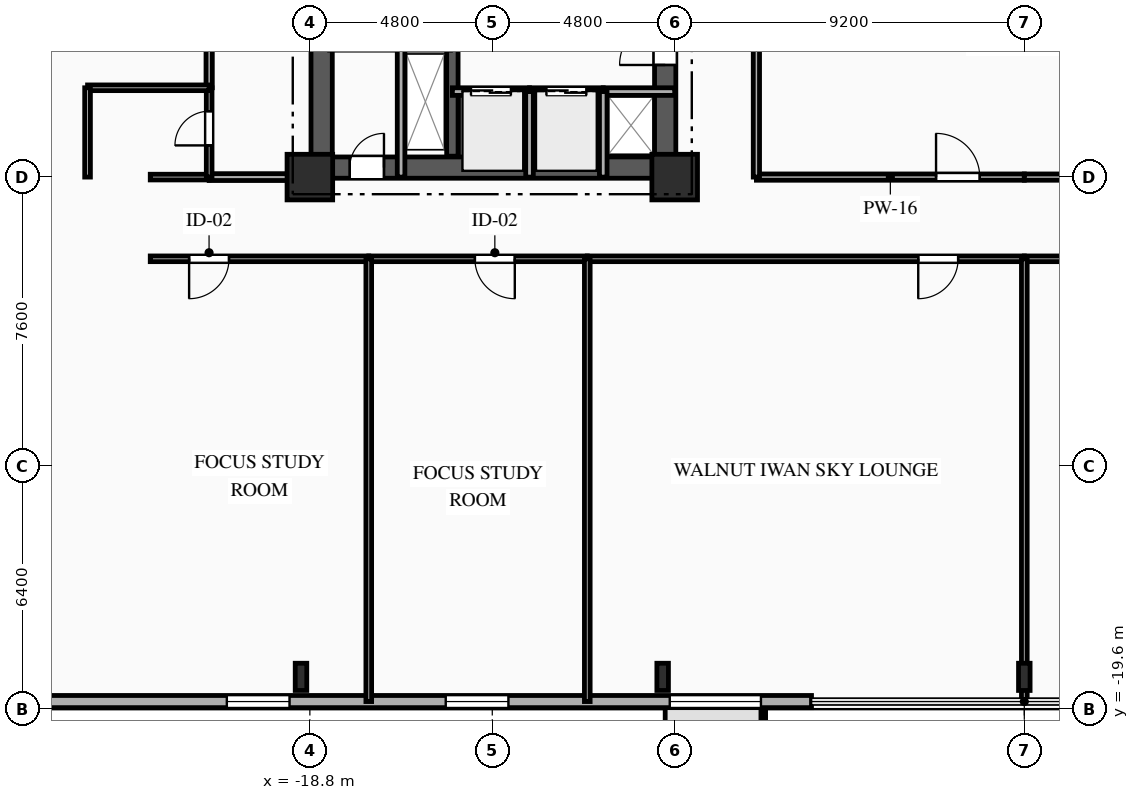
"""IFC4 building model, lengths in metres.
Left out: names, types, materials, properties, quantities, classifications, styles, units other than length and angle.
Written with IfcOpenShell. Run it as: python <this file> out.ifc"""

import sys

from ifc_helpers import new_model, si_unit, direction, frame, frame_2d, origin, origin_2d, place, context, subcontext, project, spatial, rectangle, i_section, extrude, element, fill, save


model = new_model("IFC4")
c1 = context("Model", 3, precision=1e-05, world=origin(), true_north=direction((0.0, 1.0)))
c2 = subcontext(c1, "Body", "Model", "MODEL_VIEW")
j1 = project(units=[si_unit("LENGTHUNIT", "METRE"), si_unit("PLANEANGLEUNIT", "RADIAN")], contexts=[c1])
p1 = place(None, origin())
s1 = spatial("IfcSite", under=j1, at=p1, CompositionType="ELEMENT")
p2 = place(p1, origin())
s2 = spatial("IfcBuilding", under=s1, at=p2, CompositionType="ELEMENT")
p3 = place(p2, frame((0.0, 0.0, 47.1)))
s3 = spatial("IfcBuildingStorey", under=s2, at=p3, CompositionType="ELEMENT", Elevation=47.1)
for number, where, z_axis, x_axis in (
    (1, (-18.8, -5.6, 0.0), (0.0, 0.0, 1.0), (1.0, 0.0, 0.0)),
    (2, (-9.2, -5.6, 0.0), (0.0, 0.0, 1.0), (1.0, 0.0, 0.0)),
):
    element("IfcColumn", number, at=place(p3, frame(where, z_axis=z_axis, x_axis=x_axis)), inside=s3, PredefinedType="COLUMN", context=c2, shape_type="SweptSolid", body=[
        extrude(rectangle(XDim=1.2, YDim=1.2, at=origin_2d()), origin(), (0.0, 0.0, 1.0), 3.35),
    ])
for number, where, z_axis, x_axis in (
    (3, (-19.033, -18.75, 0.0), (0.0, 0.0, 1.0), (1.0, 0.0, 0.0)),
    (4, (-9.517, -18.75, 0.0), (0.0, 0.0, 1.0), (1.0, 0.0, 0.0)),
    (5, (0.0, -18.75, 0.0), (0.0, 0.0, 1.0), (1.0, 0.0, 0.0)),
):
    element("IfcColumn", number, at=place(p3, frame(where, z_axis=z_axis, x_axis=x_axis)), inside=s3, PredefinedType="COLUMN", context=c2, shape_type="SweptSolid", body=[
        extrude(i_section(OverallWidth=0.304, OverallDepth=0.716, WebThickness=0.021, FlangeThickness=0.04, FilletRadius=0.027, at=origin_2d()), origin(), (0.0, 0.0, 1.0), 3.35),
    ])
p4 = place(p3, frame((-5.6, -19.4, 0.0), z_axis=(0.0, 0.0, 1.0), x_axis=(-1.0, 0.0, 0.0)))
e6 = element("IfcWall", 6, at=p4, inside=s3, PredefinedType="SOLIDWALL", context=c2, shape_type="SweptSolid", body=[
    extrude(rectangle(XDim=23.6, YDim=0.32, at=frame_2d((11.8, 0.0))), origin(), (0.0, 0.0, 1.0), 3.035),
])
p5 = place(p4, frame((1.33, 0.0, 0.85)))
e7 = element("IfcOpeningElement", 7, at=p5, cuts=e6, PredefinedType="OPENING", context=c2, shape_type="SweptSolid", body=[
    extrude(rectangle(XDim=2.4, YDim=1.95, at=frame_2d((1.2, 0.975))), frame((0.0, 0.17, 0.0), z_axis=(0.0, -1.0, 0.0), x_axis=(1.0, 0.0, 0.0)), (0.0, 0.0, 1.0), 0.34),
])
p6 = place(p4, frame((7.975, 0.0, 0.85)))
e8 = element("IfcOpeningElement", 8, at=p6, cuts=e6, PredefinedType="OPENING", context=c2, shape_type="SweptSolid", body=[
    extrude(rectangle(XDim=1.65, YDim=1.85, at=frame_2d((0.825, 0.925))), frame((0.0, 0.17, 0.0), z_axis=(0.0, -1.0, 0.0), x_axis=(1.0, 0.0, 0.0)), (0.0, 0.0, 1.0), 0.34),
])
p7 = place(p4, frame((13.735, 0.0, 0.85)))
e9 = element("IfcOpeningElement", 9, at=p7, cuts=e6, PredefinedType="OPENING", context=c2, shape_type="SweptSolid", body=[
    extrude(rectangle(XDim=1.65, YDim=1.85, at=frame_2d((0.825, 0.925))), frame((0.0, 0.17, 0.0), z_axis=(0.0, -1.0, 0.0), x_axis=(1.0, 0.0, 0.0)), (0.0, 0.0, 1.0), 0.34),
])
p8 = place(p3, frame((-18.8, -5.35, 0.0), z_axis=(0.0, 0.0, 1.0), x_axis=(1.0, 0.0, 0.0)))
e10 = element("IfcWall", 10, at=p8, inside=s3, PredefinedType="SHEAR", context=c2, shape_type="SweptSolid", body=[
    extrude(rectangle(XDim=9.6, YDim=0.56, at=frame_2d((4.8, 0.0))), origin(), (0.0, 0.0, 1.0), 3.035),
])
p9 = place(p8, frame((1.05, 0.0, 0.0)))
e11 = element("IfcOpeningElement", 11, at=p9, cuts=e10, PredefinedType="OPENING", context=c2, shape_type="SweptSolid", body=[
    extrude(rectangle(XDim=0.9, YDim=2.1, at=frame_2d((0.45, 1.05))), frame((0.0, 0.29, 0.0), z_axis=(0.0, -1.0, 0.0), x_axis=(1.0, 0.0, 0.0)), (0.0, 0.0, 1.0), 0.58),
])
p10 = place(p3, frame((-18.49, -5.05, 0.0), z_axis=(0.0, 0.0, 1.0), x_axis=(0.0, 1.0, 0.0)))
e12 = element("IfcWall", 12, at=p10, inside=s3, PredefinedType="SHEAR", context=c2, shape_type="SweptSolid", body=[
    extrude(rectangle(XDim=10.1, YDim=0.56, at=frame_2d((5.05, 0.0))), origin(), (0.0, 0.0, 1.0), 3.035),
])
p11 = place(p3, frame((-9.45, -5.05, 0.0), z_axis=(0.0, 0.0, 1.0), x_axis=(0.0, 1.0, 0.0)))
e13 = element("IfcWall", 13, at=p11, inside=s3, PredefinedType="SHEAR", context=c2, shape_type="SweptSolid", body=[
    extrude(rectangle(XDim=10.1, YDim=0.56, at=frame_2d((5.05, 0.0))), origin(), (0.0, 0.0, 1.0), 3.035),
])
p12 = place(p11, frame((7.15, 0.0, 0.0)))
e14 = element("IfcOpeningElement", 14, at=p12, cuts=e13, PredefinedType="OPENING", context=c2, shape_type="SweptSolid", body=[
    extrude(rectangle(XDim=0.9, YDim=2.1, at=frame_2d((0.45, 1.05))), frame((0.0, 0.29, 0.0), z_axis=(0.0, -1.0, 0.0), x_axis=(1.0, 0.0, 0.0)), (0.0, 0.0, 1.0), 0.58),
])
p13 = place(p11, frame((2.4, 0.0, 0.0)))
e15 = element("IfcOpeningElement", 15, at=p13, cuts=e13, PredefinedType="OPENING", context=c2, shape_type="SweptSolid", body=[
    extrude(rectangle(XDim=1.2, YDim=2.15, at=frame_2d((0.6, 1.075))), frame((0.0, 0.29, 0.0), z_axis=(0.0, -1.0, 0.0), x_axis=(1.0, 0.0, 0.0)), (0.0, 0.0, 1.0), 0.58),
])
p14 = place(p3, frame((-15.05, -5.05, 0.0), z_axis=(0.0, 0.0, 1.0), x_axis=(0.0, 1.0, 0.0)))
e16 = element("IfcWall", 16, at=p14, inside=s3, PredefinedType="SHEAR", context=c2, shape_type="SweptSolid", body=[
    extrude(rectangle(XDim=10.1, YDim=0.3, at=frame_2d((5.05, 0.0))), origin(), (0.0, 0.0, 1.0), 3.035),
])
p15 = place(p3, frame((-16.4, -5.6, 0.0), z_axis=(0.0, 0.0, 1.0), x_axis=(0.0, 1.0, 0.0)))
e17 = element("IfcWall", 17, at=p15, inside=s3, PredefinedType="PARTITIONING", context=c2, shape_type="SweptSolid", body=[
    extrude(rectangle(XDim=3.49, YDim=0.2, at=frame_2d((1.745, 0.0))), origin(), (0.0, 0.0, 1.0), 3.035),
])
p16 = place(p3, frame((-15.05, -3.35, 0.0), z_axis=(0.0, 0.0, 1.0), x_axis=(1.0, 0.0, 0.0)))
e18 = element("IfcWall", 18, at=p16, inside=s3, PredefinedType="PARTITIONING", context=c2, shape_type="SweptSolid", body=[
    extrude(rectangle(XDim=2.03, YDim=0.2, at=frame_2d((1.015, 0.0))), origin(), (0.0, 0.0, 1.0), 3.035),
])
p17 = place(p16, frame((0.49, 0.0, 0.0)))
e19 = element("IfcOpeningElement", 19, at=p17, cuts=e18, PredefinedType="OPENING", context=c2, shape_type="SweptSolid", body=[
    extrude(rectangle(XDim=1.05, YDim=2.1, at=frame_2d((0.525, 1.05))), frame((0.0, 0.11, 0.0), z_axis=(0.0, -1.0, 0.0), x_axis=(1.0, 0.0, 0.0)), (0.0, 0.0, 1.0), 0.22),
])
p18 = place(p3, frame((-13.02, -3.35, 0.0), z_axis=(0.0, 0.0, 1.0), x_axis=(1.0, 0.0, 0.0)))
e20 = element("IfcWall", 20, at=p18, inside=s3, PredefinedType="PARTITIONING", context=c2, shape_type="SweptSolid", body=[
    extrude(rectangle(XDim=1.94, YDim=0.2, at=frame_2d((0.97, 0.0))), origin(), (0.0, 0.0, 1.0), 3.035),
])
p19 = place(p18, frame((0.445, 0.0, 0.0)))
e21 = element("IfcOpeningElement", 21, at=p19, cuts=e20, PredefinedType="OPENING", context=c2, shape_type="SweptSolid", body=[
    extrude(rectangle(XDim=1.05, YDim=2.1, at=frame_2d((0.525, 1.05))), frame((0.0, 0.11, 0.0), z_axis=(0.0, -1.0, 0.0), x_axis=(1.0, 0.0, 0.0)), (0.0, 0.0, 1.0), 0.22),
])
p20 = place(p3, frame((-11.08, -3.35, 0.0), z_axis=(0.0, 0.0, 1.0), x_axis=(1.0, 0.0, 0.0)))
e22 = element("IfcWall", 22, at=p20, inside=s3, PredefinedType="PARTITIONING", context=c2, shape_type="SweptSolid", body=[
    extrude(rectangle(XDim=1.88, YDim=0.2, at=frame_2d((0.94, 0.0))), origin(), (0.0, 0.0, 1.0), 2.75),
])
for number, where, z_axis, x_axis in (
    (23, (-13.02, -5.6, 0.0), (0.0, 0.0, 1.0), (0.0, 1.0, 0.0)),
    (24, (-11.08, -5.6, 0.0), (0.0, 0.0, 1.0), (0.0, 1.0, 0.0)),
):
    element("IfcWall", number, at=place(p3, frame(where, z_axis=z_axis, x_axis=x_axis)), inside=s3, PredefinedType="PARTITIONING", context=c2, shape_type="SweptSolid", body=[
        extrude(rectangle(XDim=2.25, YDim=0.2, at=frame_2d((1.125, 0.0))), origin(), (0.0, 0.0, 1.0), 3.035),
    ])
p21 = place(p3, frame((-21.45, -5.6, 0.0), z_axis=(0.0, 0.0, 1.0), x_axis=(1.0, 0.0, 0.0)))
e25 = element("IfcWall", 25, at=p21, inside=s3, PredefinedType="PARTITIONING", context=c2, shape_type="SweptSolid", body=[
    extrude(rectangle(XDim=2.65, YDim=0.18, at=frame_2d((1.325, 0.0))), origin(), (0.0, 0.0, 1.0), 3.035),
])
p22 = place(p3, frame((-23.0, -5.6, 0.0), z_axis=(0.0, 0.0, 1.0), x_axis=(1.0, 0.0, 0.0)))
e26 = element("IfcWall", 26, at=p22, inside=s3, PredefinedType="PLUMBINGWALL", context=c2, shape_type="SweptSolid", body=[
    extrude(rectangle(XDim=1.55, YDim=0.15, at=frame_2d((0.775, 0.0))), origin(), (0.0, 0.0, 1.0), 3.035),
])
p23 = place(p3, frame((-17.25, -7.75, 0.0), z_axis=(0.0, 0.0, 1.0), x_axis=(-1.0, 0.0, 0.0)))
e27 = element("IfcWall", 27, at=p23, inside=s3, PredefinedType="PARTITIONING", context=c2, shape_type="SweptSolid", body=[
    extrude(rectangle(XDim=5.75, YDim=0.15, at=frame_2d((2.875, 0.0))), origin(), (0.0, 0.0, 1.0), 3.035),
])
p24 = place(p23, frame((3.677, 0.0, 0.0)))
e28 = element("IfcOpeningElement", 28, at=p24, cuts=e27, PredefinedType="OPENING", context=c2, shape_type="SweptSolid", body=[
    extrude(rectangle(XDim=1.05, YDim=2.15, at=frame_2d((0.525, 1.075))), frame((0.0, 0.085, 0.0), z_axis=(0.0, -1.0, 0.0), x_axis=(1.0, 0.0, 0.0)), (0.0, 0.0, 1.0), 0.17),
])
p25 = place(p3, frame((-11.5, -7.75, 0.0), z_axis=(0.0, 0.0, 1.0), x_axis=(-1.0, 0.0, 0.0)))
e29 = element("IfcWall", 29, at=p25, inside=s3, PredefinedType="PARTITIONING", context=c2, shape_type="SweptSolid", body=[
    extrude(rectangle(XDim=5.75, YDim=0.15, at=frame_2d((2.875, 0.0))), origin(), (0.0, 0.0, 1.0), 3.035),
])
p26 = place(p25, frame((1.907, 0.0, 0.0)))
e30 = element("IfcOpeningElement", 30, at=p26, cuts=e29, PredefinedType="OPENING", context=c2, shape_type="SweptSolid", body=[
    extrude(rectangle(XDim=1.05, YDim=2.15, at=frame_2d((0.525, 1.075))), frame((0.0, 0.085, 0.0), z_axis=(0.0, -1.0, 0.0), x_axis=(1.0, 0.0, 0.0)), (0.0, 0.0, 1.0), 0.17),
])
p27 = place(p3, frame((0.0, -7.75, 0.0), z_axis=(0.0, 0.0, 1.0), x_axis=(-1.0, 0.0, 0.0)))
e31 = element("IfcWall", 31, at=p27, inside=s3, PredefinedType="PARTITIONING", context=c2, shape_type="SweptSolid", body=[
    extrude(rectangle(XDim=11.5, YDim=0.15, at=frame_2d((5.75, 0.0))), origin(), (0.0, 0.0, 1.0), 3.035),
])
p28 = place(p27, frame((1.741, 0.0, 0.0)))
e32 = element("IfcOpeningElement", 32, at=p28, cuts=e31, PredefinedType="OPENING", context=c2, shape_type="SweptSolid", body=[
    extrude(rectangle(XDim=1.05, YDim=2.15, at=frame_2d((0.525, 1.075))), frame((0.0, 0.085, 0.0), z_axis=(0.0, -1.0, 0.0), x_axis=(1.0, 0.0, 0.0)), (0.0, 0.0, 1.0), 0.17),
])
p29 = place(p3, frame((-7.05, -5.6, 0.0), z_axis=(0.0, 0.0, 1.0), x_axis=(1.0, 0.0, 0.0)))
e33 = element("IfcWall", 33, at=p29, inside=s3, PredefinedType="PARTITIONING", context=c2, shape_type="SweptSolid", body=[
    extrude(rectangle(XDim=7.05, YDim=0.165, at=frame_2d((3.525, 0.0))), origin(), (0.0, 0.0, 1.0), 2.52),
])
p30 = place(p29, frame((4.728, 0.0, 0.0)))
e34 = element("IfcOpeningElement", 34, at=p30, cuts=e33, PredefinedType="OPENING", context=c2, shape_type="SweptSolid", body=[
    extrude(rectangle(XDim=1.15, YDim=2.15, at=frame_2d((0.575, 1.075))), frame((0.0, 0.093, 0.0), z_axis=(0.0, -1.0, 0.0), x_axis=(1.0, 0.0, 0.0)), (0.0, 0.0, 1.0), 0.185),
])
p31 = place(p3, frame((11.5, -7.75, 0.0), z_axis=(0.0, 0.0, 1.0), x_axis=(-1.0, 0.0, 0.0)))
e35 = element("IfcWall", 35, at=p31, inside=s3, PredefinedType="PARTITIONING", context=c2, shape_type="SweptSolid", body=[
    extrude(rectangle(XDim=11.5, YDim=0.15, at=frame_2d((5.75, 0.0))), origin(), (0.0, 0.0, 1.0), 3.035),
])
p32 = place(p31, frame((8.709, 0.0, 0.0)))
e36 = element("IfcOpeningElement", 36, at=p32, cuts=e35, PredefinedType="OPENING", context=c2, shape_type="SweptSolid", body=[
    extrude(rectangle(XDim=1.05, YDim=2.15, at=frame_2d((0.525, 1.075))), frame((0.0, 0.085, 0.0), z_axis=(0.0, -1.0, 0.0), x_axis=(1.0, 0.0, 0.0)), (0.0, 0.0, 1.0), 0.17),
])
p33 = place(p3, frame((0.0, -5.6, 0.0), z_axis=(0.0, 0.0, 1.0), x_axis=(1.0, 0.0, 0.0)))
e37 = element("IfcWall", 37, at=p33, inside=s3, PredefinedType="PARTITIONING", context=c2, shape_type="SweptSolid", body=[
    extrude(rectangle(XDim=7.05, YDim=0.165, at=frame_2d((3.525, 0.0))), origin(), (0.0, 0.0, 1.0), 2.52),
])
p34 = place(p3, frame((-7.05, 1.45, 0.0), z_axis=(0.0, 0.0, 1.0), x_axis=(0.0, -1.0, 0.0)))
e38 = element("IfcWall", 38, at=p34, inside=s3, PredefinedType="PARTITIONING", context=c2, shape_type="SweptSolid", body=[
    extrude(rectangle(XDim=7.05, YDim=0.165, at=frame_2d((3.525, 0.0))), origin(), (0.0, 0.0, 1.0), 3.035),
])
p35 = place(p3, frame((-21.45, -5.6, 0.0), z_axis=(0.0, 0.0, 1.0), x_axis=(0.0, 1.0, 0.0)))
e39 = element("IfcWall", 39, at=p35, inside=s3, PredefinedType="PLUMBINGWALL", context=c2, shape_type="SweptSolid", body=[
    extrude(rectangle(XDim=2.35, YDim=0.15, at=frame_2d((1.175, 0.0))), origin(), (0.0, 0.0, 1.0), 3.035),
])
p36 = place(p35, frame((0.834, 0.0, 0.0)))
e40 = element("IfcOpeningElement", 40, at=p36, cuts=e39, PredefinedType="OPENING", context=c2, shape_type="SweptSolid", body=[
    extrude(rectangle(XDim=0.9, YDim=2.1, at=frame_2d((0.45, 1.05))), frame((0.0, 0.085, 0.0), z_axis=(0.0, -1.0, 0.0), x_axis=(1.0, 0.0, 0.0)), (0.0, 0.0, 1.0), 0.17),
])
p37 = place(p3, frame((-21.45, -3.25, 0.0), z_axis=(0.0, 0.0, 1.0), x_axis=(0.0, 1.0, 0.0)))
e41 = element("IfcWall", 41, at=p37, inside=s3, PredefinedType="PARTITIONING", context=c2, shape_type="SweptSolid", body=[
    extrude(rectangle(XDim=3.29, YDim=0.165, at=frame_2d((1.645, 0.0))), origin(), (0.0, 0.0, 1.0), 3.035),
])
p38 = place(p37, frame((1.438, 0.0, 0.0)))
e42 = element("IfcOpeningElement", 42, at=p38, cuts=e41, PredefinedType="OPENING", context=c2, shape_type="SweptSolid", body=[
    extrude(rectangle(XDim=1.15, YDim=2.15, at=frame_2d((0.575, 1.075))), frame((0.0, 0.093, 0.0), z_axis=(0.0, -1.0, 0.0), x_axis=(1.0, 0.0, 0.0)), (0.0, 0.0, 1.0), 0.185),
])
p39 = place(p3, frame((-24.65, -3.25, 0.0), z_axis=(0.0, 0.0, 1.0), x_axis=(1.0, 0.0, 0.0)))
e43 = element("IfcWall", 43, at=p39, inside=s3, PredefinedType="PLUMBINGWALL", context=c2, shape_type="SweptSolid", body=[
    extrude(rectangle(XDim=3.2, YDim=0.15, at=frame_2d((1.6, 0.0))), origin(), (0.0, 0.0, 1.0), 2.52),
])
p40 = place(p3, frame((-24.65, -5.6, 0.0), z_axis=(0.0, 0.0, 1.0), x_axis=(0.0, 1.0, 0.0)))
e44 = element("IfcWall", 44, at=p40, inside=s3, PredefinedType="PLUMBINGWALL", context=c2, shape_type="SweptSolid", body=[
    extrude(rectangle(XDim=2.35, YDim=0.15, at=frame_2d((1.175, 0.0))), origin(), (0.0, 0.0, 1.0), 3.035),
])
for number, where, z_axis, x_axis in (
    (45, (-17.25, -7.75, 0.0), (0.0, 0.0, 1.0), (0.0, -1.0, 0.0)),
    (46, (-11.5, -7.75, 0.0), (0.0, 0.0, 1.0), (0.0, -1.0, 0.0)),
    (47, (0.0, -7.75, 0.0), (0.0, 0.0, 1.0), (0.0, -1.0, 0.0)),
):
    element("IfcWall", number, at=place(p3, frame(where, z_axis=z_axis, x_axis=x_axis)), inside=s3, PredefinedType="PARTITIONING", context=c2, shape_type="SweptSolid", body=[
        extrude(rectangle(XDim=11.65, YDim=0.15, at=frame_2d((5.825, 0.0))), origin(), (0.0, 0.0, 1.0), 3.035),
    ])
p41 = place(p5, origin())
e48 = element("IfcWindow", 48, at=p41, inside=s3, PartitioningType="SINGLE_PANEL", PredefinedType="WINDOW", context=c2, shape_type="SweptSolid", body=[
    extrude(rectangle(XDim=2.4, YDim=1.95, at=frame_2d((1.2, 0.975))), frame((0.0, 0.03, 0.0), z_axis=(0.0, -1.0, 0.0), x_axis=(1.0, 0.0, 0.0)), (0.0, 0.0, 1.0), 0.06),
])
fill(e7, e48)
p42 = place(p6, origin())
e49 = element("IfcWindow", 49, at=p42, inside=s3, PartitioningType="SINGLE_PANEL", PredefinedType="WINDOW", context=c2, shape_type="SweptSolid", body=[
    extrude(rectangle(XDim=1.65, YDim=1.85, at=frame_2d((0.825, 0.925))), frame((0.0, 0.03, 0.0), z_axis=(0.0, -1.0, 0.0), x_axis=(1.0, 0.0, 0.0)), (0.0, 0.0, 1.0), 0.06),
])
fill(e8, e49)
p43 = place(p7, origin())
e50 = element("IfcWindow", 50, at=p43, inside=s3, PartitioningType="SINGLE_PANEL", PredefinedType="WINDOW", context=c2, shape_type="SweptSolid", body=[
    extrude(rectangle(XDim=1.65, YDim=1.85, at=frame_2d((0.825, 0.925))), frame((0.0, 0.03, 0.0), z_axis=(0.0, -1.0, 0.0), x_axis=(1.0, 0.0, 0.0)), (0.0, 0.0, 1.0), 0.06),
])
fill(e9, e50)
p44 = place(p9, origin())
e51 = element("IfcDoor", 51, at=p44, inside=s3, OperationType="SINGLE_SWING_RIGHT", PredefinedType="DOOR", context=c2, shape_type="SweptSolid", body=[
    extrude(rectangle(XDim=0.9, YDim=2.1, at=frame_2d((0.45, 1.05))), frame((0.0, 0.025, 0.0), z_axis=(0.0, -1.0, 0.0), x_axis=(1.0, 0.0, 0.0)), (0.0, 0.0, 1.0), 0.05),
])
fill(e11, e51)
p45 = place(p17, origin())
e52 = element("IfcDoor", 52, at=p45, inside=s3, OperationType="DOUBLE_DOOR_SLIDING", PredefinedType="DOOR", context=c2, shape_type="SweptSolid", body=[
    extrude(rectangle(XDim=1.05, YDim=2.1, at=frame_2d((0.525, 1.05))), frame((0.0, 0.025, 0.0), z_axis=(0.0, -1.0, 0.0), x_axis=(1.0, 0.0, 0.0)), (0.0, 0.0, 1.0), 0.05),
])
fill(e19, e52)
p46 = place(p19, origin())
e53 = element("IfcDoor", 53, at=p46, inside=s3, OperationType="DOUBLE_DOOR_SLIDING", PredefinedType="DOOR", context=c2, shape_type="SweptSolid", body=[
    extrude(rectangle(XDim=1.05, YDim=2.1, at=frame_2d((0.525, 1.05))), frame((0.0, 0.025, 0.0), z_axis=(0.0, -1.0, 0.0), x_axis=(1.0, 0.0, 0.0)), (0.0, 0.0, 1.0), 0.05),
])
fill(e21, e53)
p47 = place(p13, origin())
e54 = element("IfcDoor", 54, at=p47, inside=s3, OperationType="SINGLE_SWING_LEFT", PredefinedType="DOOR", context=c2, shape_type="SweptSolid", body=[
    extrude(rectangle(XDim=1.2, YDim=2.15, at=frame_2d((0.6, 1.075))), frame((0.0, 0.025, 0.0), z_axis=(0.0, -1.0, 0.0), x_axis=(1.0, 0.0, 0.0)), (0.0, 0.0, 1.0), 0.05),
])
fill(e15, e54)
p48 = place(p24, origin())
e55 = element("IfcDoor", 55, at=p48, inside=s3, OperationType="SINGLE_SWING_RIGHT", PredefinedType="DOOR", context=c2, shape_type="SweptSolid", body=[
    extrude(rectangle(XDim=1.05, YDim=2.15, at=frame_2d((0.525, 1.075))), frame((0.0, 0.025, 0.0), z_axis=(0.0, -1.0, 0.0), x_axis=(1.0, 0.0, 0.0)), (0.0, 0.0, 1.0), 0.05),
])
fill(e28, e55)
p49 = place(p26, origin())
e56 = element("IfcDoor", 56, at=p49, inside=s3, OperationType="SINGLE_SWING_LEFT", PredefinedType="DOOR", context=c2, shape_type="SweptSolid", body=[
    extrude(rectangle(XDim=1.05, YDim=2.15, at=frame_2d((0.525, 1.075))), frame((0.0, 0.025, 0.0), z_axis=(0.0, -1.0, 0.0), x_axis=(1.0, 0.0, 0.0)), (0.0, 0.0, 1.0), 0.05),
])
fill(e30, e56)
p50 = place(p28, origin())
e57 = element("IfcDoor", 57, at=p50, inside=s3, OperationType="SINGLE_SWING_RIGHT", PredefinedType="DOOR", context=c2, shape_type="SweptSolid", body=[
    extrude(rectangle(XDim=1.05, YDim=2.15, at=frame_2d((0.525, 1.075))), frame((0.0, 0.025, 0.0), z_axis=(0.0, -1.0, 0.0), x_axis=(1.0, 0.0, 0.0)), (0.0, 0.0, 1.0), 0.05),
])
fill(e32, e57)
p51 = place(p30, origin())
e58 = element("IfcDoor", 58, at=p51, inside=s3, OperationType="SINGLE_SWING_LEFT", PredefinedType="DOOR", context=c2, shape_type="SweptSolid", body=[
    extrude(rectangle(XDim=1.15, YDim=2.15, at=frame_2d((0.575, 1.075))), frame((0.0, 0.025, 0.0), z_axis=(0.0, -1.0, 0.0), x_axis=(1.0, 0.0, 0.0)), (0.0, 0.0, 1.0), 0.05),
])
fill(e34, e58)
p52 = place(p36, origin())
e59 = element("IfcDoor", 59, at=p52, inside=s3, OperationType="SINGLE_SWING_LEFT", PredefinedType="DOOR", context=c2, shape_type="SweptSolid", body=[
    extrude(rectangle(XDim=0.9, YDim=2.1, at=frame_2d((0.45, 1.05))), frame((0.0, 0.025, 0.0), z_axis=(0.0, -1.0, 0.0), x_axis=(1.0, 0.0, 0.0)), (0.0, 0.0, 1.0), 0.05),
])
fill(e40, e59)
save(model, sys.argv[1])
